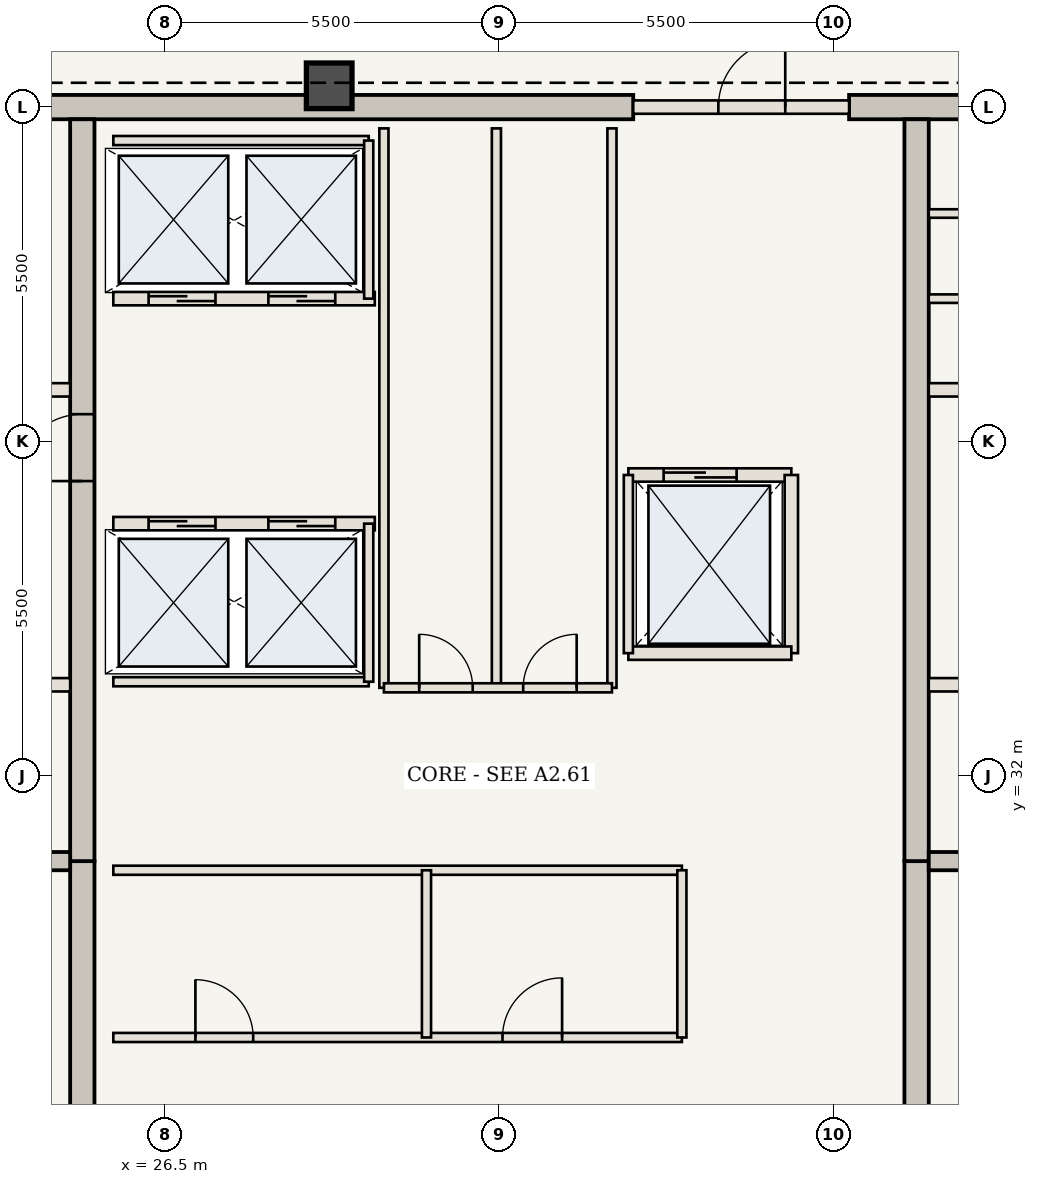
"""IFC4 building model, lengths in metres.
Left out: names, types, materials, properties, quantities, classifications, styles, units other than length and angle.
Written with IfcOpenShell. Run it as: python <this file> out.ifc"""

import sys

from ifc_helpers import new_model, si_unit, direction, frame, frame_2d, origin, origin_2d, place, context, subcontext, project, spatial, rectangle, extrude, element, fill, save


model = new_model("IFC4")
c1 = context("Model", 3, precision=1e-05, world=origin(), true_north=direction((0.0, 1.0)))
c2 = subcontext(c1, "Body", "Model", "MODEL_VIEW")
j1 = project(units=[si_unit("LENGTHUNIT", "METRE"), si_unit("PLANEANGLEUNIT", "RADIAN")], contexts=[c1])
p1 = place(None, origin())
s1 = spatial("IfcSite", under=j1, at=p1, CompositionType="ELEMENT")
p2 = place(p1, origin())
s2 = spatial("IfcBuilding", under=s1, at=p2, CompositionType="ELEMENT")
p3 = place(p2, frame((0.0, 0.0, 277.55)))
s3 = spatial("IfcBuildingStorey", under=s2, at=p3, CompositionType="ELEMENT", Elevation=277.55)
p4 = place(p3, frame((21.41, 43.0, 0.0), z_axis=(0.0, 0.0, 1.0), x_axis=(1.0, 0.0, 0.0)))
e1 = element("IfcWall", 1, at=p4, inside=s3, PredefinedType="SHEAR", context=c2, shape_type="SweptSolid", body=[
    extrude(rectangle(XDim=12.79, YDim=0.4, at=frame_2d((6.395, 0.0))), origin(), (0.0, 0.0, 1.0), 3.85),
])
p5 = place(p3, frame((37.75, 43.0, 0.0), z_axis=(0.0, 0.0, 1.0), x_axis=(1.0, 0.0, 0.0)))
e2 = element("IfcWall", 2, at=p5, inside=s3, PredefinedType="SHEAR", context=c2, shape_type="SweptSolid", body=[
    extrude(rectangle(XDim=4.84, YDim=0.4, at=frame_2d((2.42, 0.0))), origin(), (0.0, 0.0, 1.0), 3.85),
])
p6 = place(p3, frame((25.14, 21.15, 0.0), z_axis=(0.0, 0.0, 1.0), x_axis=(0.0, 1.0, 0.0)))
e3 = element("IfcWall", 3, at=p6, inside=s3, PredefinedType="SHEAR", context=c2, shape_type="SweptSolid", body=[
    extrude(rectangle(XDim=9.45, YDim=0.4, at=frame_2d((4.725, 0.0))), origin(), (0.0, 0.0, 1.0), 3.85),
])
p7 = place(p3, frame((25.14, 30.6, 0.0), z_axis=(0.0, 0.0, 1.0), x_axis=(0.0, 1.0, 0.0)))
e4 = element("IfcWall", 4, at=p7, inside=s3, PredefinedType="SHEAR", context=c2, shape_type="SweptSolid", body=[
    extrude(rectangle(XDim=12.2, YDim=0.4, at=frame_2d((6.1, 0.0))), origin(), (0.0, 0.0, 1.0), 3.85),
])
p8 = place(p7, frame((6.25, 0.0, 0.0)))
e5 = element("IfcOpeningElement", 5, at=p8, cuts=e4, PredefinedType="OPENING", context=c2, shape_type="SweptSolid", body=[
    extrude(rectangle(XDim=1.1, YDim=2.15, at=frame_2d((0.55, 1.075))), frame((0.0, 0.21, 0.0), z_axis=(0.0, -1.0, 0.0), x_axis=(1.0, 0.0, 0.0)), (0.0, 0.0, 1.0), 0.42),
])
p9 = place(p3, frame((38.86, 21.15, 0.0), z_axis=(0.0, 0.0, 1.0), x_axis=(0.0, 1.0, 0.0)))
e6 = element("IfcWall", 6, at=p9, inside=s3, PredefinedType="SHEAR", context=c2, shape_type="SweptSolid", body=[
    extrude(rectangle(XDim=9.45, YDim=0.4, at=frame_2d((4.725, 0.0))), origin(), (0.0, 0.0, 1.0), 3.85),
])
p10 = place(p3, frame((38.86, 30.6, 0.0), z_axis=(0.0, 0.0, 1.0), x_axis=(0.0, 1.0, 0.0)))
e7 = element("IfcWall", 7, at=p10, inside=s3, PredefinedType="SHEAR", context=c2, shape_type="SweptSolid", body=[
    extrude(rectangle(XDim=12.2, YDim=0.4, at=frame_2d((6.1, 0.0))), origin(), (0.0, 0.0, 1.0), 3.85),
])
p11 = place(p3, frame((29.2, 43.35, 0.0), z_axis=(0.0, 0.0, 1.0), x_axis=(1.0, 0.0, 0.0)))
e8 = element("IfcColumn", 8, at=p11, inside=s3, PredefinedType="COLUMN", context=c2, shape_type="SweptSolid", body=[
    extrude(rectangle(XDim=0.75, YDim=0.75, at=origin_2d()), origin(), (0.0, 0.0, 1.0), 3.85),
])
for number, where, z_axis, x_axis in (
    (9, (21.41, 30.6, 0.0), (0.0, 0.0, 1.0), (1.0, 0.0, 0.0)),
    (10, (39.06, 30.6, 0.0), (0.0, 0.0, 1.0), (1.0, 0.0, 0.0)),
):
    element("IfcWall", number, at=place(p3, frame(where, z_axis=z_axis, x_axis=x_axis)), inside=s3, PredefinedType="SHEAR", context=c2, shape_type="SweptSolid", body=[
        extrude(rectangle(XDim=3.53, YDim=0.3, at=frame_2d((1.765, 0.0))), origin(), (0.0, 0.0, 1.0), 3.685),
    ])
p12 = place(p3, frame((21.41, 33.5, 0.0), z_axis=(0.0, 0.0, 1.0), x_axis=(1.0, 0.0, 0.0)))
e11 = element("IfcWall", 11, at=p12, inside=s3, PredefinedType="STANDARD", context=c2, shape_type="SweptSolid", body=[
    extrude(rectangle(XDim=3.53, YDim=0.22, at=frame_2d((1.765, 0.0))), origin(), (0.0, 0.0, 1.0), 3.685),
])
p13 = place(p12, frame((0.75, 0.0, 0.0)))
e12 = element("IfcOpeningElement", 12, at=p13, cuts=e11, PredefinedType="OPENING", context=c2, shape_type="SweptSolid", body=[
    extrude(rectangle(XDim=1.2, YDim=2.2, at=frame_2d((0.6, 1.1))), frame((0.0, 0.12, 0.0), z_axis=(0.0, -1.0, 0.0), x_axis=(1.0, 0.0, 0.0)), (0.0, 0.0, 1.0), 0.24),
])
p14 = place(p3, frame((39.06, 33.5, 0.0), z_axis=(0.0, 0.0, 1.0), x_axis=(1.0, 0.0, 0.0)))
e13 = element("IfcWall", 13, at=p14, inside=s3, PredefinedType="STANDARD", context=c2, shape_type="SweptSolid", body=[
    extrude(rectangle(XDim=3.53, YDim=0.22, at=frame_2d((1.765, 0.0))), origin(), (0.0, 0.0, 1.0), 3.685),
])
p15 = place(p14, frame((1.55, 0.0, 0.0)))
e14 = element("IfcOpeningElement", 14, at=p15, cuts=e13, PredefinedType="OPENING", context=c2, shape_type="SweptSolid", body=[
    extrude(rectangle(XDim=1.2, YDim=2.2, at=frame_2d((0.6, 1.1))), frame((0.0, 0.12, 0.0), z_axis=(0.0, -1.0, 0.0), x_axis=(1.0, 0.0, 0.0)), (0.0, 0.0, 1.0), 0.24),
])
for number, where, z_axis, x_axis in (
    (15, (21.41, 38.35, 0.0), (0.0, 0.0, 1.0), (1.0, 0.0, 0.0)),
    (16, (39.06, 38.35, 0.0), (0.0, 0.0, 1.0), (1.0, 0.0, 0.0)),
):
    element("IfcWall", number, at=place(p3, frame(where, z_axis=z_axis, x_axis=x_axis)), inside=s3, PredefinedType="STANDARD", context=c2, shape_type="SweptSolid", body=[
        extrude(rectangle(XDim=3.53, YDim=0.22, at=frame_2d((1.765, 0.0))), origin(), (0.0, 0.0, 1.0), 3.685),
    ])
for number, where, z_axis, x_axis in (
    (17, (39.06, 39.85, 0.0), (0.0, 0.0, 1.0), (1.0, 0.0, 0.0)),
    (18, (39.06, 41.25, 0.0), (0.0, 0.0, 1.0), (1.0, 0.0, 0.0)),
):
    element("IfcWall", number, at=place(p3, frame(where, z_axis=z_axis, x_axis=x_axis)), inside=s3, PredefinedType="STANDARD", context=c2, shape_type="SweptSolid", body=[
        extrude(rectangle(XDim=3.53, YDim=0.14, at=frame_2d((1.765, 0.0))), origin(), (0.0, 0.0, 1.0), 3.685),
    ])
p16 = place(p3, frame((25.65, 27.7, 0.0), z_axis=(0.0, 0.0, 1.0), x_axis=(1.0, 0.0, 0.0)))
e19 = element("IfcWall", 19, at=p16, inside=s3, PredefinedType="STANDARD", context=c2, shape_type="SweptSolid", body=[
    extrude(rectangle(XDim=9.35, YDim=0.15, at=frame_2d((4.675, 0.0))), origin(), (0.0, 0.0, 1.0), 3.685),
])
p17 = place(p16, frame((1.35, 0.0, 0.0)))
e20 = element("IfcOpeningElement", 20, at=p17, cuts=e19, PredefinedType="OPENING", context=c2, shape_type="SweptSolid", body=[
    extrude(rectangle(XDim=0.95, YDim=2.15, at=frame_2d((0.475, 1.075))), frame((0.0, 0.085, 0.0), z_axis=(0.0, -1.0, 0.0), x_axis=(1.0, 0.0, 0.0)), (0.0, 0.0, 1.0), 0.17),
])
p18 = place(p16, frame((6.4, 0.0, 0.0)))
e21 = element("IfcOpeningElement", 21, at=p18, cuts=e19, PredefinedType="OPENING", context=c2, shape_type="SweptSolid", body=[
    extrude(rectangle(XDim=0.98, YDim=2.2, at=frame_2d((0.49, 1.1))), frame((0.0, 0.085, 0.0), z_axis=(0.0, -1.0, 0.0), x_axis=(1.0, 0.0, 0.0)), (0.0, 0.0, 1.0), 0.17),
])
p19 = place(p3, frame((25.65, 30.45, 0.0), z_axis=(0.0, 0.0, 1.0), x_axis=(1.0, 0.0, 0.0)))
e22 = element("IfcWall", 22, at=p19, inside=s3, PredefinedType="STANDARD", context=c2, shape_type="SweptSolid", body=[
    extrude(rectangle(XDim=9.35, YDim=0.15, at=frame_2d((4.675, 0.0))), origin(), (0.0, 0.0, 1.0), 3.685),
])
for number, where, z_axis, x_axis in (
    (23, (30.8, 27.7, 0.0), (0.0, 0.0, 1.0), (0.0, 1.0, 0.0)),
    (24, (35.0, 27.7, 0.0), (0.0, 0.0, 1.0), (0.0, 1.0, 0.0)),
):
    element("IfcWall", number, at=place(p3, frame(where, z_axis=z_axis, x_axis=x_axis)), inside=s3, PredefinedType="STANDARD", context=c2, shape_type="SweptSolid", body=[
        extrude(rectangle(XDim=2.75, YDim=0.15, at=frame_2d((1.375, 0.0))), origin(), (0.0, 0.0, 1.0), 3.685),
    ])
p20 = place(p3, frame((25.65, 36.15, 0.0), z_axis=(0.0, 0.0, 1.0), x_axis=(1.0, 0.0, 0.0)))
e25 = element("IfcWall", 25, at=p20, inside=s3, PredefinedType="STANDARD", context=c2, shape_type="SweptSolid", body=[
    extrude(rectangle(XDim=4.3, YDim=0.22, at=frame_2d((2.15, 0.0))), origin(), (0.0, 0.0, 1.0), 3.685),
])
p21 = place(p20, frame((0.58, 0.0, 0.0)))
e26 = element("IfcOpeningElement", 26, at=p21, cuts=e25, PredefinedType="OPENING", context=c2, shape_type="SweptSolid", body=[
    extrude(rectangle(XDim=1.1, YDim=2.15, at=frame_2d((0.55, 1.075))), frame((0.0, 0.12, 0.0), z_axis=(0.0, -1.0, 0.0), x_axis=(1.0, 0.0, 0.0)), (0.0, 0.0, 1.0), 0.24),
])
p22 = place(p20, frame((2.55, 0.0, 0.0)))
e27 = element("IfcOpeningElement", 27, at=p22, cuts=e25, PredefinedType="OPENING", context=c2, shape_type="SweptSolid", body=[
    extrude(rectangle(XDim=1.1, YDim=2.15, at=frame_2d((0.55, 1.075))), frame((0.0, 0.12, 0.0), z_axis=(0.0, -1.0, 0.0), x_axis=(1.0, 0.0, 0.0)), (0.0, 0.0, 1.0), 0.24),
])
p23 = place(p3, frame((25.65, 33.55, 0.0), z_axis=(0.0, 0.0, 1.0), x_axis=(1.0, 0.0, 0.0)))
e28 = element("IfcWall", 28, at=p23, inside=s3, PredefinedType="STANDARD", context=c2, shape_type="SweptSolid", body=[
    extrude(rectangle(XDim=4.2, YDim=0.15, at=frame_2d((2.1, 0.0))), origin(), (0.0, 0.0, 1.0), 3.685),
])
p24 = place(p3, frame((29.85, 33.55, 0.0), z_axis=(0.0, 0.0, 1.0), x_axis=(0.0, 1.0, 0.0)))
e29 = element("IfcWall", 29, at=p24, inside=s3, PredefinedType="STANDARD", context=c2, shape_type="SweptSolid", body=[
    extrude(rectangle(XDim=2.6, YDim=0.15, at=frame_2d((1.3, 0.0))), origin(), (0.0, 0.0, 1.0), 3.685),
])
p25 = place(p3, frame((25.65, 39.85, 0.0), z_axis=(0.0, 0.0, 1.0), x_axis=(1.0, 0.0, 0.0)))
e30 = element("IfcWall", 30, at=p25, inside=s3, PredefinedType="STANDARD", context=c2, shape_type="SweptSolid", body=[
    extrude(rectangle(XDim=4.3, YDim=0.22, at=frame_2d((2.15, 0.0))), origin(), (0.0, 0.0, 1.0), 3.685),
])
p26 = place(p25, frame((0.58, 0.0, 0.0)))
e31 = element("IfcOpeningElement", 31, at=p26, cuts=e30, PredefinedType="OPENING", context=c2, shape_type="SweptSolid", body=[
    extrude(rectangle(XDim=1.1, YDim=2.15, at=frame_2d((0.55, 1.075))), frame((0.0, 0.12, 0.0), z_axis=(0.0, -1.0, 0.0), x_axis=(1.0, 0.0, 0.0)), (0.0, 0.0, 1.0), 0.24),
])
p27 = place(p25, frame((2.55, 0.0, 0.0)))
e32 = element("IfcOpeningElement", 32, at=p27, cuts=e30, PredefinedType="OPENING", context=c2, shape_type="SweptSolid", body=[
    extrude(rectangle(XDim=1.1, YDim=2.15, at=frame_2d((0.55, 1.075))), frame((0.0, 0.12, 0.0), z_axis=(0.0, -1.0, 0.0), x_axis=(1.0, 0.0, 0.0)), (0.0, 0.0, 1.0), 0.24),
])
p28 = place(p3, frame((25.65, 42.45, 0.0), z_axis=(0.0, 0.0, 1.0), x_axis=(1.0, 0.0, 0.0)))
e33 = element("IfcWall", 33, at=p28, inside=s3, PredefinedType="STANDARD", context=c2, shape_type="SweptSolid", body=[
    extrude(rectangle(XDim=4.2, YDim=0.15, at=frame_2d((2.1, 0.0))), origin(), (0.0, 0.0, 1.0), 3.685),
])
p29 = place(p3, frame((29.85, 39.85, 0.0), z_axis=(0.0, 0.0, 1.0), x_axis=(0.0, 1.0, 0.0)))
e34 = element("IfcWall", 34, at=p29, inside=s3, PredefinedType="STANDARD", context=c2, shape_type="SweptSolid", body=[
    extrude(rectangle(XDim=2.6, YDim=0.15, at=frame_2d((1.3, 0.0))), origin(), (0.0, 0.0, 1.0), 3.685),
])
for number, where, z_axis, x_axis in (
    (35, (30.1, 33.45, 0.0), (0.0, 0.0, 1.0), (0.0, 1.0, 0.0)),
    (36, (31.95, 33.45, 0.0), (0.0, 0.0, 1.0), (0.0, 1.0, 0.0)),
    (37, (33.85, 33.45, 0.0), (0.0, 0.0, 1.0), (0.0, 1.0, 0.0)),
):
    element("IfcWall", number, at=place(p3, frame(where, z_axis=z_axis, x_axis=x_axis)), inside=s3, PredefinedType="STANDARD", context=c2, shape_type="SweptSolid", body=[
        extrude(rectangle(XDim=9.2, YDim=0.15, at=frame_2d((4.6, 0.0))), origin(), (0.0, 0.0, 1.0), 3.685),
    ])
p30 = place(p3, frame((30.1, 33.45, 0.0), z_axis=(0.0, 0.0, 1.0), x_axis=(1.0, 0.0, 0.0)))
e38 = element("IfcWall", 38, at=p30, inside=s3, PredefinedType="STANDARD", context=c2, shape_type="SweptSolid", body=[
    extrude(rectangle(XDim=3.75, YDim=0.15, at=frame_2d((1.875, 0.0))), origin(), (0.0, 0.0, 1.0), 3.685),
])
p31 = place(p30, frame((0.58, 0.0, 0.0)))
e39 = element("IfcOpeningElement", 39, at=p31, cuts=e38, PredefinedType="OPENING", context=c2, shape_type="SweptSolid", body=[
    extrude(rectangle(XDim=0.88, YDim=2.1, at=frame_2d((0.44, 1.05))), frame((0.0, 0.085, 0.0), z_axis=(0.0, -1.0, 0.0), x_axis=(1.0, 0.0, 0.0)), (0.0, 0.0, 1.0), 0.17),
])
p32 = place(p30, frame((2.29, 0.0, 0.0)))
e40 = element("IfcOpeningElement", 40, at=p32, cuts=e38, PredefinedType="OPENING", context=c2, shape_type="SweptSolid", body=[
    extrude(rectangle(XDim=0.88, YDim=2.1, at=frame_2d((0.44, 1.05))), frame((0.0, 0.085, 0.0), z_axis=(0.0, -1.0, 0.0), x_axis=(1.0, 0.0, 0.0)), (0.0, 0.0, 1.0), 0.17),
])
p33 = place(p3, frame((34.2, 43.0, 0.0), z_axis=(0.0, 0.0, 1.0), x_axis=(1.0, 0.0, 0.0)))
e41 = element("IfcWall", 41, at=p33, inside=s3, PredefinedType="STANDARD", context=c2, shape_type="SweptSolid", body=[
    extrude(rectangle(XDim=3.55, YDim=0.22, at=frame_2d((1.775, 0.0))), origin(), (0.0, 0.0, 1.0), 3.685),
])
p34 = place(p33, frame((1.4, 0.0, 0.0)))
e42 = element("IfcOpeningElement", 42, at=p34, cuts=e41, PredefinedType="OPENING", context=c2, shape_type="SweptSolid", body=[
    extrude(rectangle(XDim=1.1, YDim=2.15, at=frame_2d((0.55, 1.075))), frame((0.0, 0.12, 0.0), z_axis=(0.0, -1.0, 0.0), x_axis=(1.0, 0.0, 0.0)), (0.0, 0.0, 1.0), 0.24),
])
p35 = place(p3, frame((34.12, 36.95, 0.0), z_axis=(0.0, 0.0, 1.0), x_axis=(1.0, 0.0, 0.0)))
e43 = element("IfcWall", 43, at=p35, inside=s3, PredefinedType="STANDARD", context=c2, shape_type="SweptSolid", body=[
    extrude(rectangle(XDim=2.68, YDim=0.22, at=frame_2d((1.34, 0.0))), origin(), (0.0, 0.0, 1.0), 3.685),
])
p36 = place(p35, frame((0.58, 0.0, 0.0)))
e44 = element("IfcOpeningElement", 44, at=p36, cuts=e43, PredefinedType="OPENING", context=c2, shape_type="SweptSolid", body=[
    extrude(rectangle(XDim=1.2, YDim=2.2, at=frame_2d((0.6, 1.1))), frame((0.0, 0.12, 0.0), z_axis=(0.0, -1.0, 0.0), x_axis=(1.0, 0.0, 0.0)), (0.0, 0.0, 1.0), 0.24),
])
p37 = place(p3, frame((36.8, 34.02, 0.0), z_axis=(0.0, 0.0, 1.0), x_axis=(0.0, 1.0, 0.0)))
e45 = element("IfcWall", 45, at=p37, inside=s3, PredefinedType="STANDARD", context=c2, shape_type="SweptSolid", body=[
    extrude(rectangle(XDim=2.93, YDim=0.22, at=frame_2d((1.465, 0.0))), origin(), (0.0, 0.0, 1.0), 3.685),
])
p38 = place(p3, frame((34.12, 34.02, 0.0), z_axis=(0.0, 0.0, 1.0), x_axis=(1.0, 0.0, 0.0)))
e46 = element("IfcWall", 46, at=p38, inside=s3, PredefinedType="STANDARD", context=c2, shape_type="SweptSolid", body=[
    extrude(rectangle(XDim=2.68, YDim=0.22, at=frame_2d((1.34, 0.0))), origin(), (0.0, 0.0, 1.0), 3.685),
])
p39 = place(p3, frame((34.12, 34.02, 0.0), z_axis=(0.0, 0.0, 1.0), x_axis=(0.0, 1.0, 0.0)))
e47 = element("IfcWall", 47, at=p39, inside=s3, PredefinedType="STANDARD", context=c2, shape_type="SweptSolid", body=[
    extrude(rectangle(XDim=2.93, YDim=0.15, at=frame_2d((1.465, 0.0))), origin(), (0.0, 0.0, 1.0), 3.685),
])
p40 = place(p8, origin())
e48 = element("IfcDoor", 48, at=p40, inside=s3, OperationType="SINGLE_SWING_LEFT", PredefinedType="DOOR", context=c2, shape_type="SweptSolid", body=[
    extrude(rectangle(XDim=1.1, YDim=2.15, at=frame_2d((0.55, 1.075))), frame((0.0, 0.025, 0.0), z_axis=(0.0, -1.0, 0.0), x_axis=(1.0, 0.0, 0.0)), (0.0, 0.0, 1.0), 0.05),
])
fill(e5, e48)
p41 = place(p17, origin())
e49 = element("IfcDoor", 49, at=p41, inside=s3, OperationType="SINGLE_SWING_LEFT", PredefinedType="DOOR", context=c2, shape_type="SweptSolid", body=[
    extrude(rectangle(XDim=0.95, YDim=2.15, at=frame_2d((0.475, 1.075))), frame((0.0, 0.025, 0.0), z_axis=(0.0, -1.0, 0.0), x_axis=(1.0, 0.0, 0.0)), (0.0, 0.0, 1.0), 0.05),
])
fill(e20, e49)
p42 = place(p18, origin())
e50 = element("IfcDoor", 50, at=p42, inside=s3, OperationType="SINGLE_SWING_RIGHT", PredefinedType="DOOR", context=c2, shape_type="SweptSolid", body=[
    extrude(rectangle(XDim=0.98, YDim=2.2, at=frame_2d((0.49, 1.1))), frame((0.0, 0.025, 0.0), z_axis=(0.0, -1.0, 0.0), x_axis=(1.0, 0.0, 0.0)), (0.0, 0.0, 1.0), 0.05),
])
fill(e21, e50)
p43 = place(p21, origin())
e51 = element("IfcDoor", 51, at=p43, inside=s3, OperationType="DOUBLE_DOOR_SLIDING", PredefinedType="DOOR", context=c2, shape_type="SweptSolid", body=[
    extrude(rectangle(XDim=1.1, YDim=2.15, at=frame_2d((0.55, 1.075))), frame((0.0, 0.025, 0.0), z_axis=(0.0, -1.0, 0.0), x_axis=(1.0, 0.0, 0.0)), (0.0, 0.0, 1.0), 0.05),
])
fill(e26, e51)
p44 = place(p22, origin())
e52 = element("IfcDoor", 52, at=p44, inside=s3, OperationType="DOUBLE_DOOR_SLIDING", PredefinedType="DOOR", context=c2, shape_type="SweptSolid", body=[
    extrude(rectangle(XDim=1.1, YDim=2.15, at=frame_2d((0.55, 1.075))), frame((0.0, 0.025, 0.0), z_axis=(0.0, -1.0, 0.0), x_axis=(1.0, 0.0, 0.0)), (0.0, 0.0, 1.0), 0.05),
])
fill(e27, e52)
p45 = place(p26, origin())
e53 = element("IfcDoor", 53, at=p45, inside=s3, OperationType="DOUBLE_DOOR_SLIDING", PredefinedType="DOOR", context=c2, shape_type="SweptSolid", body=[
    extrude(rectangle(XDim=1.1, YDim=2.15, at=frame_2d((0.55, 1.075))), frame((0.0, 0.025, 0.0), z_axis=(0.0, -1.0, 0.0), x_axis=(1.0, 0.0, 0.0)), (0.0, 0.0, 1.0), 0.05),
])
fill(e31, e53)
p46 = place(p27, origin())
e54 = element("IfcDoor", 54, at=p46, inside=s3, OperationType="DOUBLE_DOOR_SLIDING", PredefinedType="DOOR", context=c2, shape_type="SweptSolid", body=[
    extrude(rectangle(XDim=1.1, YDim=2.15, at=frame_2d((0.55, 1.075))), frame((0.0, 0.025, 0.0), z_axis=(0.0, -1.0, 0.0), x_axis=(1.0, 0.0, 0.0)), (0.0, 0.0, 1.0), 0.05),
])
fill(e32, e54)
p47 = place(p31, origin())
e55 = element("IfcDoor", 55, at=p47, inside=s3, OperationType="SINGLE_SWING_LEFT", PredefinedType="DOOR", context=c2, shape_type="SweptSolid", body=[
    extrude(rectangle(XDim=0.88, YDim=2.1, at=frame_2d((0.44, 1.05))), frame((0.0, 0.025, 0.0), z_axis=(0.0, -1.0, 0.0), x_axis=(1.0, 0.0, 0.0)), (0.0, 0.0, 1.0), 0.05),
])
fill(e39, e55)
p48 = place(p32, origin())
e56 = element("IfcDoor", 56, at=p48, inside=s3, OperationType="SINGLE_SWING_RIGHT", PredefinedType="DOOR", context=c2, shape_type="SweptSolid", body=[
    extrude(rectangle(XDim=0.88, YDim=2.1, at=frame_2d((0.44, 1.05))), frame((0.0, 0.025, 0.0), z_axis=(0.0, -1.0, 0.0), x_axis=(1.0, 0.0, 0.0)), (0.0, 0.0, 1.0), 0.05),
])
fill(e40, e56)
p49 = place(p34, origin())
e57 = element("IfcDoor", 57, at=p49, inside=s3, OperationType="SINGLE_SWING_RIGHT", PredefinedType="DOOR", context=c2, shape_type="SweptSolid", body=[
    extrude(rectangle(XDim=1.1, YDim=2.15, at=frame_2d((0.55, 1.075))), frame((0.0, 0.025, 0.0), z_axis=(0.0, -1.0, 0.0), x_axis=(1.0, 0.0, 0.0)), (0.0, 0.0, 1.0), 0.05),
])
fill(e42, e57)
p50 = place(p36, origin())
e58 = element("IfcDoor", 58, at=p50, inside=s3, OperationType="DOUBLE_DOOR_SLIDING", PredefinedType="DOOR", context=c2, shape_type="SweptSolid", body=[
    extrude(rectangle(XDim=1.2, YDim=2.2, at=frame_2d((0.6, 1.1))), frame((0.0, 0.025, 0.0), z_axis=(0.0, -1.0, 0.0), x_axis=(1.0, 0.0, 0.0)), (0.0, 0.0, 1.0), 0.05),
])
fill(e44, e58)
save(model, sys.argv[1])
